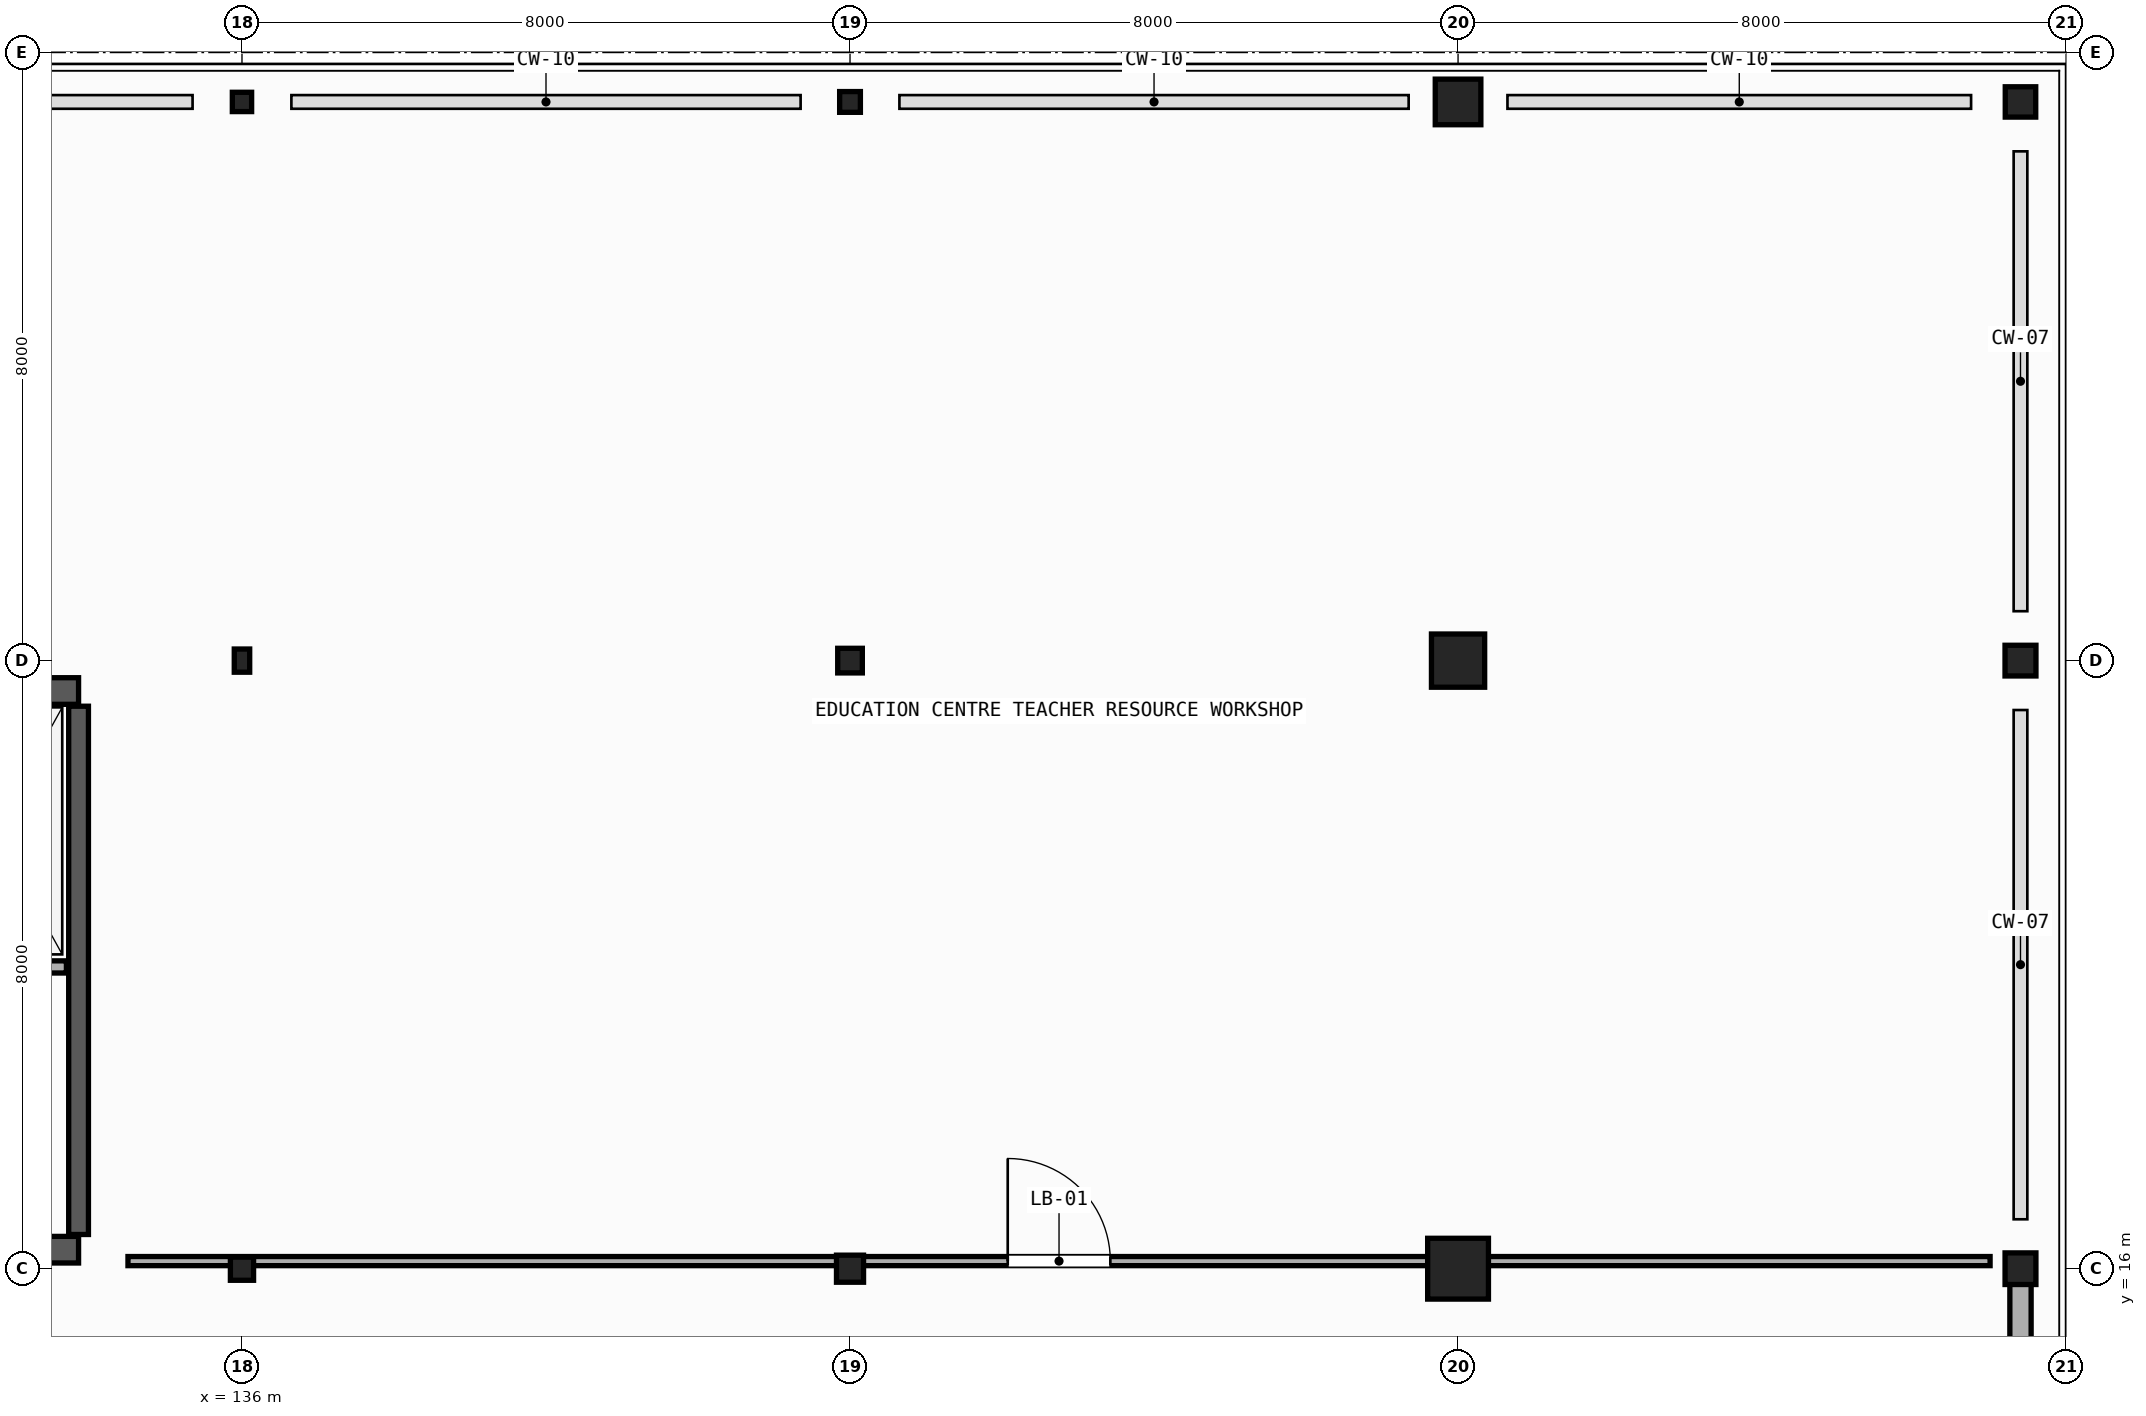
"""IFC4 building model, lengths in metres.
Left out: names, types, materials, properties, quantities, classifications, styles, units other than length and angle.
Written with IfcOpenShell. Run it as: python <this file> out.ifc"""

import sys

from ifc_helpers import new_model, si_unit, direction, frame, frame_2d, origin, origin_2d, place, context, subcontext, project, spatial, rectangle, hollow_rectangle, hollow_circle, i_section, extrude, element, fill, save


model = new_model("IFC4")
c1 = context("Model", 3, precision=1e-05, world=origin(), true_north=direction((0.0, 1.0)))
c2 = subcontext(c1, "Body", "Model", "MODEL_VIEW")
j1 = project(units=[si_unit("LENGTHUNIT", "METRE"), si_unit("PLANEANGLEUNIT", "RADIAN")], contexts=[c1])
p1 = place(None, origin())
s1 = spatial("IfcSite", under=j1, at=p1, CompositionType="ELEMENT")
p2 = place(p1, origin())
s2 = spatial("IfcBuilding", under=s1, at=p2, CompositionType="ELEMENT")
p3 = place(p2, frame((0.0, 0.0, 5.4)))
s3 = spatial("IfcBuildingStorey", under=s2, at=p3, CompositionType="ELEMENT", Elevation=5.4)
p4 = place(p3, frame((136.0, 16.0, 0.0), z_axis=(0.0, 0.0, 1.0), x_axis=(0.0, 1.0, 0.0)))
e1 = element("IfcColumn", 1, at=p4, inside=s3, PredefinedType="COLUMN", context=c2, shape_type="SweptSolid", body=[
    extrude(hollow_rectangle(XDim=0.305, YDim=0.305, WallThickness=0.012, InnerFilletRadius=0.012, OuterFilletRadius=0.024, at=origin_2d()), origin(), (0.0, 0.0, 1.0), 4.54),
])
p5 = place(p3, frame((136.0, 24.0, 0.0), z_axis=(0.0, 0.0, 1.0), x_axis=(1.0, 0.0, 0.0)))
e2 = element("IfcColumn", 2, at=p5, inside=s3, PredefinedType="COLUMN", context=c2, shape_type="SweptSolid", body=[
    extrude(hollow_rectangle(XDim=0.203, YDim=0.305, WallThickness=0.009, InnerFilletRadius=0.009, OuterFilletRadius=0.018, at=origin_2d()), origin(), (0.0, 0.0, 1.0), 4.54),
])
p6 = place(p3, frame((136.0, 31.35, 0.0), z_axis=(0.0, 0.0, 1.0), x_axis=(0.0, 1.0, 0.0)))
e3 = element("IfcColumn", 3, at=p6, inside=s3, PredefinedType="COLUMN", context=c2, shape_type="SweptSolid", body=[
    extrude(hollow_rectangle(XDim=0.254, YDim=0.254, WallThickness=0.012, InnerFilletRadius=0.012, OuterFilletRadius=0.024, at=origin_2d()), origin(), (0.0, 0.0, 1.0), 4.8),
])
p7 = place(p3, frame((144.0, 16.0, 0.0), z_axis=(0.0, 0.0, 1.0), x_axis=(1.0, 0.0, 0.0)))
e4 = element("IfcColumn", 4, at=p7, inside=s3, PredefinedType="COLUMN", context=c2, shape_type="SweptSolid", body=[
    extrude(hollow_circle(Radius=0.178, WallThickness=0.012, at=origin_2d()), origin(), (0.0, 0.0, 1.0), 4.54),
])
p8 = place(p3, frame((144.0, 24.0, 0.0), z_axis=(0.0, 0.0, 1.0), x_axis=(0.0, 1.0, 0.0)))
e5 = element("IfcColumn", 5, at=p8, inside=s3, PredefinedType="COLUMN", context=c2, shape_type="SweptSolid", body=[
    extrude(hollow_circle(Radius=0.162, WallThickness=0.012, at=origin_2d()), origin(), (0.0, 0.0, 1.0), 4.54),
])
p9 = place(p3, frame((144.0, 31.35, 0.0), z_axis=(0.0, 0.0, 1.0), x_axis=(1.0, 0.0, 0.0)))
e6 = element("IfcColumn", 6, at=p9, inside=s3, PredefinedType="COLUMN", context=c2, shape_type="SweptSolid", body=[
    extrude(hollow_circle(Radius=0.136, WallThickness=0.012, at=origin_2d()), origin(), (0.0, 0.0, 1.0), 4.8),
])
p10 = place(p3, frame((152.0, 16.0, 0.0), z_axis=(0.0, 0.0, 1.0), x_axis=(0.0, 1.0, 0.0)))
e7 = element("IfcColumn", 7, at=p10, inside=s3, PredefinedType="COLUMN", context=c2, shape_type="SweptSolid", body=[
    extrude(rectangle(XDim=0.8, YDim=0.8, at=origin_2d()), origin(), (0.0, 0.0, 1.0), 4.54),
])
p11 = place(p3, frame((152.0, 24.0, 0.0), z_axis=(0.0, 0.0, 1.0), x_axis=(1.0, 0.0, 0.0)))
e8 = element("IfcColumn", 8, at=p11, inside=s3, PredefinedType="COLUMN", context=c2, shape_type="SweptSolid", body=[
    extrude(rectangle(XDim=0.7, YDim=0.7, at=origin_2d()), origin(), (0.0, 0.0, 1.0), 4.54),
])
p12 = place(p3, frame((152.0, 31.35, 0.0), z_axis=(0.0, 0.0, 1.0), x_axis=(0.0, 1.0, 0.0)))
e9 = element("IfcColumn", 9, at=p12, inside=s3, PredefinedType="COLUMN", context=c2, shape_type="SweptSolid", body=[
    extrude(rectangle(XDim=0.6, YDim=0.6, at=origin_2d()), origin(), (0.0, 0.0, 1.0), 4.8),
])
p13 = place(p3, frame((159.4, 16.0, 0.0), z_axis=(0.0, 0.0, 1.0), x_axis=(1.0, 0.0, 0.0)))
e10 = element("IfcColumn", 10, at=p13, inside=s3, PredefinedType="COLUMN", context=c2, shape_type="SweptSolid", body=[
    extrude(i_section(OverallWidth=0.406, OverallDepth=0.416, WebThickness=0.03, FlangeThickness=0.048, FilletRadius=0.015, at=origin_2d()), origin(), (0.0, 0.0, 1.0), 4.54),
])
p14 = place(p3, frame((159.4, 24.0, 0.0), z_axis=(0.0, 0.0, 1.0), x_axis=(0.0, 1.0, 0.0)))
e11 = element("IfcColumn", 11, at=p14, inside=s3, PredefinedType="COLUMN", context=c2, shape_type="SweptSolid", body=[
    extrude(i_section(OverallWidth=0.404, OverallDepth=0.407, WebThickness=0.027, FlangeThickness=0.044, FilletRadius=0.015, at=origin_2d()), origin(), (0.0, 0.0, 1.0), 4.54),
])
p15 = place(p3, frame((159.4, 31.35, 0.0), z_axis=(0.0, 0.0, 1.0), x_axis=(1.0, 0.0, 0.0)))
e12 = element("IfcColumn", 12, at=p15, inside=s3, PredefinedType="COLUMN", context=c2, shape_type="SweptSolid", body=[
    extrude(i_section(OverallWidth=0.401, OverallDepth=0.399, WebThickness=0.025, FlangeThickness=0.04, FilletRadius=0.015, at=origin_2d()), origin(), (0.0, 0.0, 1.0), 4.8),
])
p16 = place(p3, frame((159.4, 8.0, 0.0), z_axis=(0.0, 0.0, 1.0), x_axis=(0.0, 1.0, 0.0)))
e13 = element("IfcWall", 13, at=p16, inside=s3, PredefinedType="STANDARD", context=c2, shape_type="SweptSolid", body=[
    extrude(rectangle(XDim=8.0, YDim=0.28, at=frame_2d((4.0, 0.0))), origin(), (0.0, 0.0, 1.0), 3.7),
])
p17 = place(p16, frame((1.767, 0.0, 1.0)))
e14 = element("IfcOpeningElement", 14, at=p17, cuts=e13, PredefinedType="OPENING", context=c2, shape_type="SweptSolid", body=[
    extrude(rectangle(XDim=1.35, YDim=1.95, at=frame_2d((0.675, 0.975))), frame((0.0, 0.15, 0.0), z_axis=(0.0, -1.0, 0.0), x_axis=(1.0, 0.0, 0.0)), (0.0, 0.0, 1.0), 0.3),
])
p18 = place(p16, frame((4.883, 0.0, 1.0)))
e15 = element("IfcOpeningElement", 15, at=p18, cuts=e13, PredefinedType="OPENING", context=c2, shape_type="SweptSolid", body=[
    extrude(rectangle(XDim=1.35, YDim=1.95, at=frame_2d((0.675, 0.975))), frame((0.0, 0.15, 0.0), z_axis=(0.0, -1.0, 0.0), x_axis=(1.0, 0.0, 0.0)), (0.0, 0.0, 1.0), 0.3),
])
p19 = place(p3, frame((128.0, 16.25, 0.0), z_axis=(0.0, 0.0, 1.0), x_axis=(1.0, 0.0, 0.0)))
e16 = element("IfcWall", 16, at=p19, inside=s3, PredefinedType="SHEAR", context=c2, shape_type="SweptSolid", body=[
    extrude(rectangle(XDim=5.85, YDim=0.35, at=frame_2d((2.925, 0.0))), origin(), (0.0, 0.0, 1.0), 4.53),
])
p20 = place(p19, frame((1.4, 0.0, 0.0)))
e17 = element("IfcOpeningElement", 17, at=p20, cuts=e16, PredefinedType="OPENING", context=c2, shape_type="SweptSolid", body=[
    extrude(rectangle(XDim=1.05, YDim=2.1, at=frame_2d((0.525, 1.05))), frame((0.0, 0.185, 0.0), z_axis=(0.0, -1.0, 0.0), x_axis=(1.0, 0.0, 0.0)), (0.0, 0.0, 1.0), 0.37),
])
p21 = place(p19, frame((4.25, 0.0, 0.0)))
e18 = element("IfcOpeningElement", 18, at=p21, cuts=e16, PredefinedType="OPENING", context=c2, shape_type="SweptSolid", body=[
    extrude(rectangle(XDim=1.0, YDim=2.15, at=frame_2d((0.5, 1.075))), frame((0.0, 0.185, 0.0), z_axis=(0.0, -1.0, 0.0), x_axis=(1.0, 0.0, 0.0)), (0.0, 0.0, 1.0), 0.37),
])
p22 = place(p3, frame((128.0, 23.6, 0.0), z_axis=(0.0, 0.0, 1.0), x_axis=(1.0, 0.0, 0.0)))
e19 = element("IfcWall", 19, at=p22, inside=s3, PredefinedType="SHEAR", context=c2, shape_type="SweptSolid", body=[
    extrude(rectangle(XDim=5.85, YDim=0.35, at=frame_2d((2.925, 0.0))), origin(), (0.0, 0.0, 1.0), 4.53),
])
p23 = place(p3, frame((133.85, 16.45, 0.0), z_axis=(0.0, 0.0, 1.0), x_axis=(0.0, 1.0, 0.0)))
e20 = element("IfcWall", 20, at=p23, inside=s3, PredefinedType="SHEAR", context=c2, shape_type="SweptSolid", body=[
    extrude(rectangle(XDim=6.95, YDim=0.26, at=frame_2d((3.475, 0.0))), origin(), (0.0, 0.0, 1.0), 4.53),
])
p24 = place(p3, frame((131.85, 19.97, 0.0), z_axis=(0.0, 0.0, 1.0), x_axis=(1.0, 0.0, 0.0)))
e21 = element("IfcWall", 21, at=p24, inside=s3, PredefinedType="PARTITIONING", context=c2, shape_type="SweptSolid", body=[
    extrude(rectangle(XDim=1.84, YDim=0.16, at=frame_2d((0.92, 0.0))), origin(), (0.0, 0.0, 1.0), 3.6),
])
p25 = place(p24, frame((0.37, 0.0, 0.0)))
e22 = element("IfcOpeningElement", 22, at=p25, cuts=e21, PredefinedType="OPENING", context=c2, shape_type="SweptSolid", body=[
    extrude(rectangle(XDim=1.1, YDim=2.15, at=frame_2d((0.55, 1.075))), frame((0.0, 0.09, 0.0), z_axis=(0.0, -1.0, 0.0), x_axis=(1.0, 0.0, 0.0)), (0.0, 0.0, 1.0), 0.18),
])
p26 = place(p3, frame((134.5, 16.1, 0.0), z_axis=(0.0, 0.0, 1.0), x_axis=(1.0, 0.0, 0.0)))
e23 = element("IfcWall", 23, at=p26, inside=s3, PredefinedType="PARTITIONING", context=c2, shape_type="SweptSolid", body=[
    extrude(rectangle(XDim=24.5, YDim=0.12, at=frame_2d((12.25, 0.0))), origin(), (0.0, 0.0, 1.0), 3.738),
])
p27 = place(p26, frame((11.575, 0.0, 0.0)))
e24 = element("IfcOpeningElement", 24, at=p27, cuts=e23, PredefinedType="OPENING", context=c2, shape_type="SweptSolid", body=[
    extrude(rectangle(XDim=1.35, YDim=2.25, at=frame_2d((0.675, 1.125))), frame((0.0, 0.07, 0.0), z_axis=(0.0, -1.0, 0.0), x_axis=(1.0, 0.0, 0.0)), (0.0, 0.0, 1.0), 0.14),
])
p28 = place(p27, origin())
e25 = element("IfcDoor", 25, at=p28, inside=s3, OperationType="SINGLE_SWING_LEFT", PredefinedType="DOOR", context=c2, shape_type="SweptSolid", body=[
    extrude(rectangle(XDim=1.35, YDim=2.25, at=frame_2d((0.675, 1.125))), frame((0.0, 0.025, 0.0), z_axis=(0.0, -1.0, 0.0), x_axis=(1.0, 0.0, 0.0)), (0.0, 0.0, 1.0), 0.05),
])
fill(e24, e25)
save(model, sys.argv[1])
